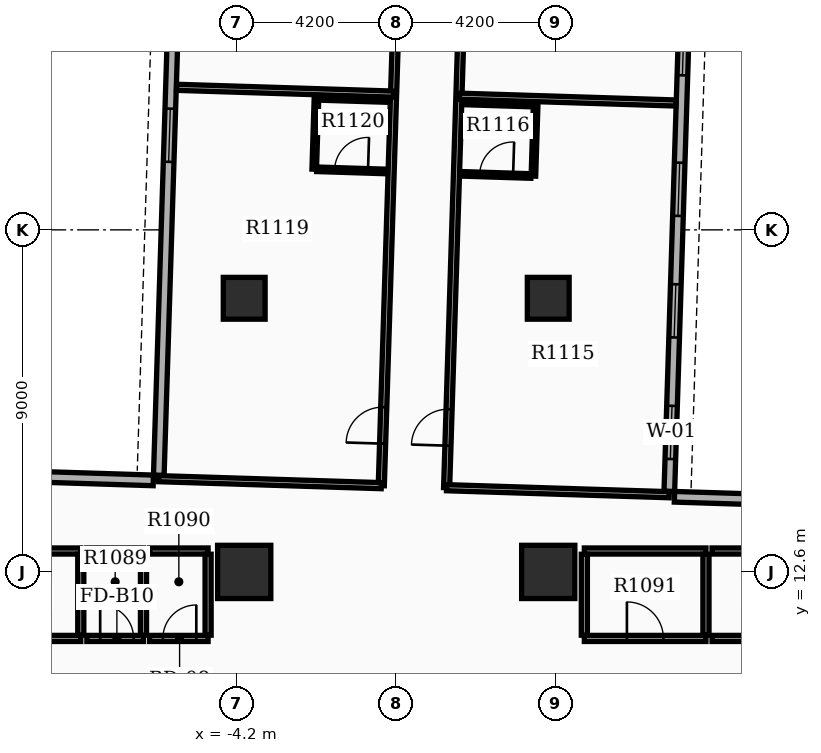
"""IFC4 building model, lengths in metres.
Left out: names, types, materials, properties, quantities, classifications, styles, units other than length and angle.
Written with IfcOpenShell. Run it as: python <this file> out.ifc"""

import sys

from ifc_helpers import new_model, si_unit, direction, frame, frame_2d, origin, origin_2d, place, context, subcontext, project, spatial, rectangle, extrude, element, fill, save


model = new_model("IFC4")
c1 = context("Model", 3, precision=1e-05, world=origin(), true_north=direction((0.0, 1.0)))
c2 = subcontext(c1, "Body", "Model", "MODEL_VIEW")
j1 = project(units=[si_unit("LENGTHUNIT", "METRE"), si_unit("PLANEANGLEUNIT", "RADIAN")], contexts=[c1])
p1 = place(None, origin())
s1 = spatial("IfcSite", under=j1, at=p1, CompositionType="ELEMENT")
p2 = place(p1, origin())
s2 = spatial("IfcBuilding", under=s1, at=p2, CompositionType="ELEMENT")
p3 = place(p2, frame((0.0, 0.0, 71.7)))
s3 = spatial("IfcBuildingStorey", under=s2, at=p3, CompositionType="ELEMENT", Elevation=71.7)
for number, where, z_axis, x_axis in (
    (1, (4.0, 12.6, 0.0), (0.0, 0.0, 1.0), (1.0, 0.0, 0.0)),
    (2, (-4.0, 12.6, 0.0), (0.0, 0.0, 1.0), (1.0, 0.0, 0.0)),
):
    element("IfcColumn", number, at=place(p3, frame(where, z_axis=z_axis, x_axis=x_axis)), inside=s3, PredefinedType="COLUMN", context=c2, shape_type="SweptSolid", body=[
        extrude(rectangle(XDim=1.4, YDim=1.4, at=origin_2d()), origin(), (0.0, 0.0, 1.0), 3.9),
    ])
for number, where, z_axis, x_axis in (
    (3, (-4.0, 19.8, 0.0), (0.0, 0.0, 1.0), (1.0, 0.0, 0.0)),
    (4, (4.0, 19.8, 0.0), (0.0, 0.0, 1.0), (1.0, 0.0, 0.0)),
):
    element("IfcColumn", number, at=place(p3, frame(where, z_axis=z_axis, x_axis=x_axis)), inside=s3, PredefinedType="COLUMN", context=c2, shape_type="SweptSolid", body=[
        extrude(rectangle(XDim=1.1, YDim=1.1, at=origin_2d()), origin(), (0.0, 0.0, 1.0), 3.9),
    ])
p4 = place(p3, frame((7.186, 14.721, 0.0), z_axis=(0.0, 0.0, 1.0), x_axis=(0.031410322165, 0.999506574096, 0.0)))
e5 = element("IfcWall", 5, at=p4, inside=s3, PredefinedType="STANDARD", context=c2, shape_type="SweptSolid", body=[
    extrude(rectangle(XDim=20.1, YDim=0.28, at=frame_2d((10.05, 0.0))), origin(), (0.0, 0.0, 1.0), 2.91),
])
p5 = place(p4, frame((0.85, 0.0, 0.8)))
e6 = element("IfcOpeningElement", 6, at=p5, cuts=e5, PredefinedType="OPENING", context=c2, shape_type="SweptSolid", body=[
    extrude(rectangle(XDim=1.4, YDim=1.6, at=frame_2d((0.7, 0.8))), frame((0.0, 0.15, 0.0), z_axis=(0.0, -1.0, 0.0), x_axis=(1.0, 0.0, 0.0)), (0.0, 0.0, 1.0), 0.3),
])
p6 = place(p4, frame((4.05, 0.0, 0.8)))
e7 = element("IfcOpeningElement", 7, at=p6, cuts=e5, PredefinedType="OPENING", context=c2, shape_type="SweptSolid", body=[
    extrude(rectangle(XDim=1.4, YDim=1.6, at=frame_2d((0.7, 0.8))), frame((0.0, 0.15, 0.0), z_axis=(0.0, -1.0, 0.0), x_axis=(1.0, 0.0, 0.0)), (0.0, 0.0, 1.0), 0.3),
])
p7 = place(p4, frame((7.25, 0.0, 0.8)))
e8 = element("IfcOpeningElement", 8, at=p7, cuts=e5, PredefinedType="OPENING", context=c2, shape_type="SweptSolid", body=[
    extrude(rectangle(XDim=1.4, YDim=1.6, at=frame_2d((0.7, 0.8))), frame((0.0, 0.15, 0.0), z_axis=(0.0, -1.0, 0.0), x_axis=(1.0, 0.0, 0.0)), (0.0, 0.0, 1.0), 0.3),
])
p8 = place(p4, frame((10.95, 0.0, 0.8)))
e9 = element("IfcOpeningElement", 9, at=p8, cuts=e5, PredefinedType="OPENING", context=c2, shape_type="SweptSolid", body=[
    extrude(rectangle(XDim=1.4, YDim=1.6, at=frame_2d((0.7, 0.8))), frame((0.0, 0.15, 0.0), z_axis=(0.0, -1.0, 0.0), x_axis=(1.0, 0.0, 0.0)), (0.0, 0.0, 1.0), 0.3),
])
p9 = place(p3, frame((-5.616, 35.234, 0.0), z_axis=(0.0, 0.0, 1.0), x_axis=(-0.031398187845, -0.999506955354, 0.0)))
e10 = element("IfcWall", 10, at=p9, inside=s3, PredefinedType="STANDARD", context=c2, shape_type="SweptSolid", body=[
    extrude(rectangle(XDim=20.1, YDim=0.28, at=frame_2d((10.05, 0.0))), origin(), (0.0, 0.0, 1.0), 2.91),
])
p10 = place(p9, frame((0.85, 0.0, 0.8)))
e11 = element("IfcOpeningElement", 11, at=p10, cuts=e10, PredefinedType="OPENING", context=c2, shape_type="SweptSolid", body=[
    extrude(rectangle(XDim=1.4, YDim=1.6, at=frame_2d((0.7, 0.8))), frame((0.0, 0.15, 0.0), z_axis=(0.0, -1.0, 0.0), x_axis=(1.0, 0.0, 0.0)), (0.0, 0.0, 1.0), 0.3),
])
p11 = place(p9, frame((4.05, 0.0, 0.8)))
e12 = element("IfcOpeningElement", 12, at=p11, cuts=e10, PredefinedType="OPENING", context=c2, shape_type="SweptSolid", body=[
    extrude(rectangle(XDim=1.4, YDim=1.6, at=frame_2d((0.7, 0.8))), frame((0.0, 0.15, 0.0), z_axis=(0.0, -1.0, 0.0), x_axis=(1.0, 0.0, 0.0)), (0.0, 0.0, 1.0), 0.3),
])
p12 = place(p9, frame((7.25, 0.0, 0.8)))
e13 = element("IfcOpeningElement", 13, at=p12, cuts=e10, PredefinedType="OPENING", context=c2, shape_type="SweptSolid", body=[
    extrude(rectangle(XDim=1.4, YDim=1.6, at=frame_2d((0.7, 0.8))), frame((0.0, 0.15, 0.0), z_axis=(0.0, -1.0, 0.0), x_axis=(1.0, 0.0, 0.0)), (0.0, 0.0, 1.0), 0.3),
])
p13 = place(p9, frame((10.45, 0.0, 0.8)))
e14 = element("IfcOpeningElement", 14, at=p13, cuts=e10, PredefinedType="OPENING", context=c2, shape_type="SweptSolid", body=[
    extrude(rectangle(XDim=1.4, YDim=1.6, at=frame_2d((0.7, 0.8))), frame((0.0, 0.15, 0.0), z_axis=(0.0, -1.0, 0.0), x_axis=(1.0, 0.0, 0.0)), (0.0, 0.0, 1.0), 0.3),
])
p14 = place(p3, frame((13.618, 14.379, 0.0), z_axis=(0.0, 0.0, 1.0), x_axis=(-0.999507224741, 0.031389611199, 0.0)))
e15 = element("IfcWall", 15, at=p14, inside=s3, PredefinedType="STANDARD", context=c2, shape_type="SweptSolid", body=[
    extrude(rectangle(XDim=6.3, YDim=0.28, at=frame_2d((3.15, 0.0))), origin(), (0.0, 0.0, 1.0), 2.91),
])
p15 = place(p3, frame((-12.689, 15.206, 0.0), z_axis=(0.0, 0.0, 1.0), x_axis=(0.999507262922, -0.031388395416, 0.0)))
e16 = element("IfcWall", 16, at=p15, inside=s3, PredefinedType="STANDARD", context=c2, shape_type="SweptSolid", body=[
    extrude(rectangle(XDim=6.3, YDim=0.28, at=frame_2d((3.15, 0.0))), origin(), (0.0, 0.0, 1.0), 2.91),
])
p16 = place(p3, frame((-11.5, 10.85, 0.0), z_axis=(0.0, 0.0, 1.0), x_axis=(1.0, 0.0, 0.0)))
e17 = element("IfcWall", 17, at=p16, inside=s3, PredefinedType="PARTITIONING", context=c2, shape_type="SweptSolid", body=[
    extrude(rectangle(XDim=3.2, YDim=0.16, at=frame_2d((1.6, 0.0))), origin(), (0.0, 0.0, 1.0), 2.9),
])
p17 = place(p16, frame((1.12, 0.0, 0.0)))
e18 = element("IfcOpeningElement", 18, at=p17, cuts=e17, PredefinedType="OPENING", context=c2, shape_type="SweptSolid", body=[
    extrude(rectangle(XDim=0.96, YDim=2.15, at=frame_2d((0.48, 1.075))), frame((0.0, 0.09, 0.0), z_axis=(0.0, -1.0, 0.0), x_axis=(1.0, 0.0, 0.0)), (0.0, 0.0, 1.0), 0.18),
])
p18 = place(p3, frame((-11.5, 13.15, 0.0), z_axis=(0.0, 0.0, 1.0), x_axis=(1.0, 0.0, 0.0)))
e19 = element("IfcWall", 19, at=p18, inside=s3, PredefinedType="PARTITIONING", context=c2, shape_type="SweptSolid", body=[
    extrude(rectangle(XDim=3.2, YDim=0.16, at=frame_2d((1.6, 0.0))), origin(), (0.0, 0.0, 1.0), 2.9),
])
p19 = place(p3, frame((-8.3, 10.935, 0.0), z_axis=(0.0, 0.0, 1.0), x_axis=(0.0, 1.0, 0.0)))
e20 = element("IfcWall", 20, at=p19, inside=s3, PredefinedType="PARTITIONING", context=c2, shape_type="SweptSolid", body=[
    extrude(rectangle(XDim=2.13, YDim=0.16, at=frame_2d((1.065, 0.0))), origin(), (0.0, 0.0, 1.0), 2.9),
])
p20 = place(p3, frame((-8.14, 10.85, 0.0), z_axis=(0.0, 0.0, 1.0), x_axis=(1.0, 0.0, 0.0)))
e21 = element("IfcWall", 21, at=p20, inside=s3, PredefinedType="PARTITIONING", context=c2, shape_type="SweptSolid", body=[
    extrude(rectangle(XDim=1.49, YDim=0.16, at=frame_2d((0.745, 0.0))), origin(), (0.0, 0.0, 1.0), 2.9),
])
p21 = place(p20, frame((0.35, 0.0, 0.0)))
e22 = element("IfcOpeningElement", 22, at=p21, cuts=e21, PredefinedType="OPENING", context=c2, shape_type="SweptSolid", body=[
    extrude(rectangle(XDim=0.88, YDim=2.1, at=frame_2d((0.44, 1.05))), frame((0.0, 0.09, 0.0), z_axis=(0.0, -1.0, 0.0), x_axis=(1.0, 0.0, 0.0)), (0.0, 0.0, 1.0), 0.18),
])
p22 = place(p3, frame((-8.14, 13.15, 0.0), z_axis=(0.0, 0.0, 1.0), x_axis=(1.0, 0.0, 0.0)))
e23 = element("IfcWall", 23, at=p22, inside=s3, PredefinedType="PARTITIONING", context=c2, shape_type="SweptSolid", body=[
    extrude(rectangle(XDim=1.49, YDim=0.16, at=frame_2d((0.745, 0.0))), origin(), (0.0, 0.0, 1.0), 2.9),
])
p23 = place(p3, frame((-6.65, 10.935, 0.0), z_axis=(0.0, 0.0, 1.0), x_axis=(0.0, 1.0, 0.0)))
e24 = element("IfcWall", 24, at=p23, inside=s3, PredefinedType="PARTITIONING", context=c2, shape_type="SweptSolid", body=[
    extrude(rectangle(XDim=2.13, YDim=0.16, at=frame_2d((1.065, 0.0))), origin(), (0.0, 0.0, 1.0), 2.9),
])
p24 = place(p3, frame((-6.49, 10.85, 0.0), z_axis=(0.0, 0.0, 1.0), x_axis=(1.0, 0.0, 0.0)))
e25 = element("IfcWall", 25, at=p24, inside=s3, PredefinedType="PARTITIONING", context=c2, shape_type="SweptSolid", body=[
    extrude(rectangle(XDim=1.54, YDim=0.16, at=frame_2d((0.77, 0.0))), origin(), (0.0, 0.0, 1.0), 2.9),
])
p25 = place(p24, frame((0.35, 0.0, 0.0)))
e26 = element("IfcOpeningElement", 26, at=p25, cuts=e25, PredefinedType="OPENING", context=c2, shape_type="SweptSolid", body=[
    extrude(rectangle(XDim=0.88, YDim=2.15, at=frame_2d((0.44, 1.075))), frame((0.0, 0.09, 0.0), z_axis=(0.0, -1.0, 0.0), x_axis=(1.0, 0.0, 0.0)), (0.0, 0.0, 1.0), 0.18),
])
p26 = place(p3, frame((-6.49, 13.15, 0.0), z_axis=(0.0, 0.0, 1.0), x_axis=(1.0, 0.0, 0.0)))
e27 = element("IfcWall", 27, at=p26, inside=s3, PredefinedType="PARTITIONING", context=c2, shape_type="SweptSolid", body=[
    extrude(rectangle(XDim=1.54, YDim=0.16, at=frame_2d((0.77, 0.0))), origin(), (0.0, 0.0, 1.0), 2.9),
])
p27 = place(p3, frame((-4.95, 10.935, 0.0), z_axis=(0.0, 0.0, 1.0), x_axis=(0.0, 1.0, 0.0)))
e28 = element("IfcWall", 28, at=p27, inside=s3, PredefinedType="PARTITIONING", context=c2, shape_type="SweptSolid", body=[
    extrude(rectangle(XDim=2.13, YDim=0.16, at=frame_2d((1.065, 0.0))), origin(), (0.0, 0.0, 1.0), 2.9),
])
p28 = place(p3, frame((4.95, 10.85, 0.0), z_axis=(0.0, 0.0, 1.0), x_axis=(1.0, 0.0, 0.0)))
e29 = element("IfcWall", 29, at=p28, inside=s3, PredefinedType="PARTITIONING", context=c2, shape_type="SweptSolid", body=[
    extrude(rectangle(XDim=3.2, YDim=0.16, at=frame_2d((1.6, 0.0))), origin(), (0.0, 0.0, 1.0), 2.9),
])
p29 = place(p28, frame((1.12, 0.0, 0.0)))
e30 = element("IfcOpeningElement", 30, at=p29, cuts=e29, PredefinedType="OPENING", context=c2, shape_type="SweptSolid", body=[
    extrude(rectangle(XDim=0.96, YDim=2.15, at=frame_2d((0.48, 1.075))), frame((0.0, 0.09, 0.0), z_axis=(0.0, -1.0, 0.0), x_axis=(1.0, 0.0, 0.0)), (0.0, 0.0, 1.0), 0.18),
])
p30 = place(p3, frame((4.95, 13.15, 0.0), z_axis=(0.0, 0.0, 1.0), x_axis=(1.0, 0.0, 0.0)))
e31 = element("IfcWall", 31, at=p30, inside=s3, PredefinedType="PARTITIONING", context=c2, shape_type="SweptSolid", body=[
    extrude(rectangle(XDim=3.2, YDim=0.16, at=frame_2d((1.6, 0.0))), origin(), (0.0, 0.0, 1.0), 2.9),
])
for number, where, z_axis, x_axis in (
    (32, (4.95, 10.935, 0.0), (0.0, 0.0, 1.0), (0.0, 1.0, 0.0)),
    (33, (8.15, 10.935, 0.0), (0.0, 0.0, 1.0), (0.0, 1.0, 0.0)),
):
    element("IfcWall", number, at=place(p3, frame(where, z_axis=z_axis, x_axis=x_axis)), inside=s3, PredefinedType="PARTITIONING", context=c2, shape_type="SweptSolid", body=[
        extrude(rectangle(XDim=2.13, YDim=0.16, at=frame_2d((1.065, 0.0))), origin(), (0.0, 0.0, 1.0), 2.9),
    ])
p31 = place(p3, frame((8.31, 10.85, 0.0), z_axis=(0.0, 0.0, 1.0), x_axis=(1.0, 0.0, 0.0)))
e34 = element("IfcWall", 34, at=p31, inside=s3, PredefinedType="PARTITIONING", context=c2, shape_type="SweptSolid", body=[
    extrude(rectangle(XDim=3.14, YDim=0.16, at=frame_2d((1.57, 0.0))), origin(), (0.0, 0.0, 1.0), 2.9),
])
p32 = place(p31, frame((1.09, 0.0, 0.0)))
e35 = element("IfcOpeningElement", 35, at=p32, cuts=e34, PredefinedType="OPENING", context=c2, shape_type="SweptSolid", body=[
    extrude(rectangle(XDim=0.96, YDim=2.15, at=frame_2d((0.48, 1.075))), frame((0.0, 0.09, 0.0), z_axis=(0.0, -1.0, 0.0), x_axis=(1.0, 0.0, 0.0)), (0.0, 0.0, 1.0), 0.18),
])
p33 = place(p3, frame((8.31, 13.15, 0.0), z_axis=(0.0, 0.0, 1.0), x_axis=(1.0, 0.0, 0.0)))
e36 = element("IfcWall", 36, at=p33, inside=s3, PredefinedType="PARTITIONING", context=c2, shape_type="SweptSolid", body=[
    extrude(rectangle(XDim=3.14, YDim=0.16, at=frame_2d((1.57, 0.0))), origin(), (0.0, 0.0, 1.0), 2.9),
])
p34 = place(p3, frame((1.326, 14.816, 0.0), z_axis=(0.0, 0.0, 1.0), x_axis=(0.031415650687, 0.999506406629, 0.0)))
e37 = element("IfcWall", 37, at=p34, inside=s3, PredefinedType="PARTITIONING", context=c2, shape_type="SweptSolid", body=[
    extrude(rectangle(XDim=20.182, YDim=0.16, at=frame_2d((10.091, 0.0))), origin(), (0.0, 0.0, 1.0), 2.9),
])
p35 = place(p34, frame((1.106, 0.0, 0.0)))
e38 = element("IfcOpeningElement", 38, at=p35, cuts=e37, PredefinedType="OPENING", context=c2, shape_type="SweptSolid", body=[
    extrude(rectangle(XDim=0.96, YDim=2.15, at=frame_2d((0.48, 1.075))), frame((0.0, 0.09, 0.0), z_axis=(0.0, -1.0, 0.0), x_axis=(1.0, 0.0, 0.0)), (0.0, 0.0, 1.0), 0.18),
])
p36 = place(p34, frame((16.28, 0.0, 0.0)))
e39 = element("IfcOpeningElement", 39, at=p36, cuts=e37, PredefinedType="OPENING", context=c2, shape_type="SweptSolid", body=[
    extrude(rectangle(XDim=0.96, YDim=2.15, at=frame_2d((0.48, 1.075))), frame((0.0, 0.09, 0.0), z_axis=(0.0, -1.0, 0.0), x_axis=(1.0, 0.0, 0.0)), (0.0, 0.0, 1.0), 0.18),
])
p37 = place(p3, frame((1.326, 14.816, 0.0), z_axis=(0.0, 0.0, 1.0), x_axis=(0.999506491758, -0.031412942136, 0.0)))
e40 = element("IfcWall", 40, at=p37, inside=s3, PredefinedType="PARTITIONING", context=c2, shape_type="SweptSolid", body=[
    extrude(rectangle(XDim=5.86, YDim=0.16, at=frame_2d((2.93, 0.0))), origin(), (0.0, 0.0, 1.0), 2.9),
])
p38 = place(p3, frame((1.65, 25.118, 0.0), z_axis=(0.0, 0.0, 1.0), x_axis=(0.999505045245, -0.031458934028, 0.0)))
e41 = element("IfcWall", 41, at=p38, inside=s3, PredefinedType="PARTITIONING", context=c2, shape_type="SweptSolid", body=[
    extrude(rectangle(XDim=5.712, YDim=0.16, at=frame_2d((2.856, 0.0))), origin(), (0.0, 0.0, 1.0), 2.9),
])
p39 = place(p3, frame((1.726, 23.074, 0.0), z_axis=(0.0, 0.0, 1.0), x_axis=(0.999507221803, -0.031389704724, 0.0)))
e42 = element("IfcWall", 42, at=p39, inside=s3, PredefinedType="PARTITIONING", context=c2, shape_type="SweptSolid", body=[
    extrude(rectangle(XDim=1.82, YDim=0.12, at=frame_2d((0.91, 0.0))), origin(), (0.0, 0.0, 1.0), 2.9),
])
p40 = place(p39, frame((0.47, 0.0, 0.0)))
e43 = element("IfcOpeningElement", 43, at=p40, cuts=e42, PredefinedType="OPENING", context=c2, shape_type="SweptSolid", body=[
    extrude(rectangle(XDim=0.88, YDim=2.1, at=frame_2d((0.44, 1.05))), frame((0.0, 0.07, 0.0), z_axis=(0.0, -1.0, 0.0), x_axis=(1.0, 0.0, 0.0)), (0.0, 0.0, 1.0), 0.14),
])
p41 = place(p3, frame((1.785, 24.953, 0.0), z_axis=(0.0, 0.0, 1.0), x_axis=(0.999503004171, -0.03152371574, 0.0)))
e44 = element("IfcWall", 44, at=p41, inside=s3, PredefinedType="PARTITIONING", context=c2, shape_type="SweptSolid", body=[
    extrude(rectangle(XDim=1.82, YDim=0.12, at=frame_2d((0.91, 0.0))), origin(), (0.0, 0.0, 1.0), 2.9),
])
p42 = place(p3, frame((3.61, 23.015, 0.0), z_axis=(0.0, 0.0, 1.0), x_axis=(0.031425292588, 0.999506103526, 0.0)))
e45 = element("IfcWall", 45, at=p42, inside=s3, PredefinedType="PARTITIONING", context=c2, shape_type="SweptSolid", body=[
    extrude(rectangle(XDim=1.88, YDim=0.12, at=frame_2d((0.94, 0.0))), origin(), (0.0, 0.0, 1.0), 2.9),
])
p43 = place(p3, frame((-0.393, 14.87, 0.0), z_axis=(0.0, 0.0, 1.0), x_axis=(0.031403565719, 0.9995067864, 0.0)))
e46 = element("IfcWall", 46, at=p43, inside=s3, PredefinedType="PARTITIONING", context=c2, shape_type="SweptSolid", body=[
    extrude(rectangle(XDim=20.182, YDim=0.16, at=frame_2d((10.091, 0.0))), origin(), (0.0, 0.0, 1.0), 2.9),
])
p44 = place(p43, frame((1.106, 0.0, 0.0)))
e47 = element("IfcOpeningElement", 47, at=p44, cuts=e46, PredefinedType="OPENING", context=c2, shape_type="SweptSolid", body=[
    extrude(rectangle(XDim=0.96, YDim=2.15, at=frame_2d((0.48, 1.075))), frame((0.0, 0.09, 0.0), z_axis=(0.0, -1.0, 0.0), x_axis=(1.0, 0.0, 0.0)), (0.0, 0.0, 1.0), 0.18),
])
p45 = place(p43, frame((16.28, 0.0, 0.0)))
e48 = element("IfcOpeningElement", 48, at=p45, cuts=e46, PredefinedType="OPENING", context=c2, shape_type="SweptSolid", body=[
    extrude(rectangle(XDim=0.96, YDim=2.15, at=frame_2d((0.48, 1.075))), frame((0.0, 0.09, 0.0), z_axis=(0.0, -1.0, 0.0), x_axis=(1.0, 0.0, 0.0)), (0.0, 0.0, 1.0), 0.18),
])
p46 = place(p3, frame((-0.393, 14.87, 0.0), z_axis=(0.0, 0.0, 1.0), x_axis=(-0.999506491758, 0.031412942136, 0.0)))
e49 = element("IfcWall", 49, at=p46, inside=s3, PredefinedType="PARTITIONING", context=c2, shape_type="SweptSolid", body=[
    extrude(rectangle(XDim=5.86, YDim=0.16, at=frame_2d((2.93, 0.0))), origin(), (0.0, 0.0, 1.0), 2.9),
])
p47 = place(p3, frame((-0.069, 25.172, 0.0), z_axis=(0.0, 0.0, 1.0), x_axis=(-0.999506430506, 0.031414891017, 0.0)))
e50 = element("IfcWall", 50, at=p47, inside=s3, PredefinedType="PARTITIONING", context=c2, shape_type="SweptSolid", body=[
    extrude(rectangle(XDim=5.712, YDim=0.16, at=frame_2d((2.856, 0.0))), origin(), (0.0, 0.0, 1.0), 2.9),
])
p48 = place(p3, frame((-2.093, 23.194, 0.0), z_axis=(0.0, 0.0, 1.0), x_axis=(0.999507221803, -0.031389704724, 0.0)))
e51 = element("IfcWall", 51, at=p48, inside=s3, PredefinedType="PARTITIONING", context=c2, shape_type="SweptSolid", body=[
    extrude(rectangle(XDim=1.82, YDim=0.12, at=frame_2d((0.91, 0.0))), origin(), (0.0, 0.0, 1.0), 2.9),
])
p49 = place(p48, frame((0.47, 0.0, 0.0)))
e52 = element("IfcOpeningElement", 52, at=p49, cuts=e51, PredefinedType="OPENING", context=c2, shape_type="SweptSolid", body=[
    extrude(rectangle(XDim=0.88, YDim=2.1, at=frame_2d((0.44, 1.05))), frame((0.0, 0.07, 0.0), z_axis=(0.0, -1.0, 0.0), x_axis=(1.0, 0.0, 0.0)), (0.0, 0.0, 1.0), 0.14),
])
p50 = place(p3, frame((-2.033, 25.073, 0.0), z_axis=(0.0, 0.0, 1.0), x_axis=(0.999507221803, -0.031389704724, 0.0)))
e53 = element("IfcWall", 53, at=p50, inside=s3, PredefinedType="PARTITIONING", context=c2, shape_type="SweptSolid", body=[
    extrude(rectangle(XDim=1.82, YDim=0.12, at=frame_2d((0.91, 0.0))), origin(), (0.0, 0.0, 1.0), 2.9),
])
p51 = place(p3, frame((-2.157, 23.196, 0.0), z_axis=(0.0, 0.0, 1.0), x_axis=(0.031429371883, 0.999505975261, 0.0)))
e54 = element("IfcWall", 54, at=p51, inside=s3, PredefinedType="PARTITIONING", context=c2, shape_type="SweptSolid", body=[
    extrude(rectangle(XDim=1.88, YDim=0.12, at=frame_2d((0.94, 0.0))), origin(), (0.0, 0.0, 1.0), 2.9),
])
p52 = place(p5, origin())
e55 = element("IfcWindow", 55, at=p52, inside=s3, PartitioningType="SINGLE_PANEL", PredefinedType="WINDOW", context=c2, shape_type="SweptSolid", body=[
    extrude(rectangle(XDim=1.4, YDim=1.6, at=frame_2d((0.7, 0.8))), frame((0.0, 0.03, 0.0), z_axis=(0.0, -1.0, 0.0), x_axis=(1.0, 0.0, 0.0)), (0.0, 0.0, 1.0), 0.06),
])
fill(e6, e55)
p53 = place(p6, origin())
e56 = element("IfcWindow", 56, at=p53, inside=s3, PartitioningType="SINGLE_PANEL", PredefinedType="WINDOW", context=c2, shape_type="SweptSolid", body=[
    extrude(rectangle(XDim=1.4, YDim=1.6, at=frame_2d((0.7, 0.8))), frame((0.0, 0.03, 0.0), z_axis=(0.0, -1.0, 0.0), x_axis=(1.0, 0.0, 0.0)), (0.0, 0.0, 1.0), 0.06),
])
fill(e7, e56)
p54 = place(p7, origin())
e57 = element("IfcWindow", 57, at=p54, inside=s3, PartitioningType="SINGLE_PANEL", PredefinedType="WINDOW", context=c2, shape_type="SweptSolid", body=[
    extrude(rectangle(XDim=1.4, YDim=1.6, at=frame_2d((0.7, 0.8))), frame((0.0, 0.03, 0.0), z_axis=(0.0, -1.0, 0.0), x_axis=(1.0, 0.0, 0.0)), (0.0, 0.0, 1.0), 0.06),
])
fill(e8, e57)
p55 = place(p8, origin())
e58 = element("IfcWindow", 58, at=p55, inside=s3, PartitioningType="SINGLE_PANEL", PredefinedType="WINDOW", context=c2, shape_type="SweptSolid", body=[
    extrude(rectangle(XDim=1.4, YDim=1.6, at=frame_2d((0.7, 0.8))), frame((0.0, 0.03, 0.0), z_axis=(0.0, -1.0, 0.0), x_axis=(1.0, 0.0, 0.0)), (0.0, 0.0, 1.0), 0.06),
])
fill(e9, e58)
p56 = place(p13, origin())
e59 = element("IfcWindow", 59, at=p56, inside=s3, PartitioningType="SINGLE_PANEL", PredefinedType="WINDOW", context=c2, shape_type="SweptSolid", body=[
    extrude(rectangle(XDim=1.4, YDim=1.6, at=frame_2d((0.7, 0.8))), frame((0.0, 0.03, 0.0), z_axis=(0.0, -1.0, 0.0), x_axis=(1.0, 0.0, 0.0)), (0.0, 0.0, 1.0), 0.06),
])
fill(e14, e59)
p57 = place(p21, origin())
e60 = element("IfcDoor", 60, at=p57, inside=s3, OperationType="SINGLE_SWING_LEFT", PredefinedType="DOOR", context=c2, shape_type="SweptSolid", body=[
    extrude(rectangle(XDim=0.88, YDim=2.1, at=frame_2d((0.44, 1.05))), frame((0.0, 0.025, 0.0), z_axis=(0.0, -1.0, 0.0), x_axis=(1.0, 0.0, 0.0)), (0.0, 0.0, 1.0), 0.05),
])
fill(e22, e60)
p58 = place(p25, origin())
e61 = element("IfcDoor", 61, at=p58, inside=s3, OperationType="SINGLE_SWING_RIGHT", PredefinedType="DOOR", context=c2, shape_type="SweptSolid", body=[
    extrude(rectangle(XDim=0.88, YDim=2.15, at=frame_2d((0.44, 1.075))), frame((0.0, 0.025, 0.0), z_axis=(0.0, -1.0, 0.0), x_axis=(1.0, 0.0, 0.0)), (0.0, 0.0, 1.0), 0.05),
])
fill(e26, e61)
p59 = place(p29, origin())
e62 = element("IfcDoor", 62, at=p59, inside=s3, OperationType="SINGLE_SWING_LEFT", PredefinedType="DOOR", context=c2, shape_type="SweptSolid", body=[
    extrude(rectangle(XDim=0.96, YDim=2.15, at=frame_2d((0.48, 1.075))), frame((0.0, 0.025, 0.0), z_axis=(0.0, -1.0, 0.0), x_axis=(1.0, 0.0, 0.0)), (0.0, 0.0, 1.0), 0.05),
])
fill(e30, e62)
p60 = place(p35, origin())
e63 = element("IfcDoor", 63, at=p60, inside=s3, OperationType="SINGLE_SWING_LEFT", PredefinedType="DOOR", context=c2, shape_type="SweptSolid", body=[
    extrude(rectangle(XDim=0.96, YDim=2.15, at=frame_2d((0.48, 1.075))), frame((0.0, 0.025, 0.0), z_axis=(0.0, -1.0, 0.0), x_axis=(1.0, 0.0, 0.0)), (0.0, 0.0, 1.0), 0.05),
])
fill(e38, e63)
p61 = place(p40, origin())
e64 = element("IfcDoor", 64, at=p61, inside=s3, OperationType="SINGLE_SWING_RIGHT", PredefinedType="DOOR", context=c2, shape_type="SweptSolid", body=[
    extrude(rectangle(XDim=0.88, YDim=2.1, at=frame_2d((0.44, 1.05))), frame((0.0, 0.025, 0.0), z_axis=(0.0, -1.0, 0.0), x_axis=(1.0, 0.0, 0.0)), (0.0, 0.0, 1.0), 0.05),
])
fill(e43, e64)
p62 = place(p44, origin())
e65 = element("IfcDoor", 65, at=p62, inside=s3, OperationType="SINGLE_SWING_LEFT", PredefinedType="DOOR", context=c2, shape_type="SweptSolid", body=[
    extrude(rectangle(XDim=0.96, YDim=2.15, at=frame_2d((0.48, 1.075))), frame((0.0, 0.025, 0.0), z_axis=(0.0, -1.0, 0.0), x_axis=(1.0, 0.0, 0.0)), (0.0, 0.0, 1.0), 0.05),
])
fill(e47, e65)
p63 = place(p49, origin())
e66 = element("IfcDoor", 66, at=p63, inside=s3, OperationType="SINGLE_SWING_RIGHT", PredefinedType="DOOR", context=c2, shape_type="SweptSolid", body=[
    extrude(rectangle(XDim=0.88, YDim=2.1, at=frame_2d((0.44, 1.05))), frame((0.0, 0.025, 0.0), z_axis=(0.0, -1.0, 0.0), x_axis=(1.0, 0.0, 0.0)), (0.0, 0.0, 1.0), 0.05),
])
fill(e52, e66)
save(model, sys.argv[1])
